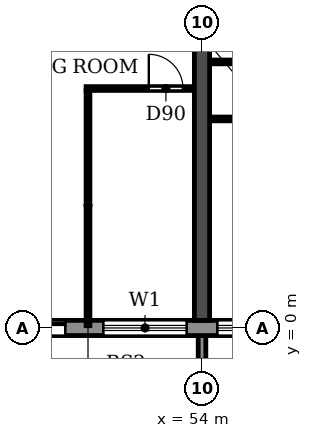
"""IFC4 building model, lengths in metres.
Left out: names, types, materials, properties, quantities, classifications, styles, units other than length and angle.
Written with IfcOpenShell. Run it as: python <this file> out.ifc"""

import sys

from ifc_helpers import new_model, si_unit, direction, frame, frame_2d, origin, place, context, subcontext, project, spatial, polyline, rectangle, outline, extrude, source, transform, mapped, element, fill, save


model = new_model("IFC4")
c1 = context("Model", 3, precision=1e-05, world=origin(), true_north=direction((0.0, 1.0)))
c2 = subcontext(c1, "Body", "Model", "MODEL_VIEW")
j1 = project(units=[si_unit("LENGTHUNIT", "METRE"), si_unit("PLANEANGLEUNIT", "RADIAN")], contexts=[c1])
p1 = place(None, origin())
s1 = spatial("IfcSite", under=j1, at=p1, CompositionType="ELEMENT")
p2 = place(p1, origin())
s2 = spatial("IfcBuilding", under=s1, at=p2, CompositionType="ELEMENT")
p3 = place(p2, frame((0.0, 0.0, 23.4)))
s3 = spatial("IfcBuildingStorey", under=s2, at=p3, CompositionType="ELEMENT", Elevation=23.4)
p4 = place(p3, frame((54.0, 0.2, 0.0), z_axis=(0.0, 0.0, 1.0), x_axis=(0.0, 1.0, 0.0)))
e1 = element("IfcWall", 1, at=p4, inside=s3, PredefinedType="SHEAR", context=c2, shape_type="SweptSolid", body=[
    extrude(rectangle(XDim=11.65, YDim=0.4, at=frame_2d((5.825, 0.0))), origin(), (0.0, 0.0, 1.0), 3.05),
])
p5 = place(p3, frame((4.683, 0.0, 0.0), z_axis=(0.0, 0.0, 1.0), x_axis=(1.0, 0.0, 0.0)))
e2 = element("IfcWall", 2, at=p5, inside=s3, PredefinedType="STANDARD", context=c2, shape_type="SweptSolid", body=[
    extrude(rectangle(XDim=92.634, YDim=0.4, at=frame_2d((46.317, 0.0))), origin(), (0.0, 0.0, 1.0), 3.05),
])
p6 = place(p5, frame((1.717, 0.0, 0.9)))
e3 = element("IfcOpeningElement", 3, at=p6, cuts=e2, PredefinedType="OPENING", context=c2, shape_type="SweptSolid", body=[
    extrude(rectangle(XDim=2.2, YDim=1.5, at=frame_2d((1.1, 0.75))), frame((0.0, 0.21, 0.0), z_axis=(0.0, -1.0, 0.0), x_axis=(1.0, 0.0, 0.0)), (0.0, 0.0, 1.0), 0.42),
])
p7 = place(p5, frame((4.717, 0.0, 0.9)))
e4 = element("IfcOpeningElement", 4, at=p7, cuts=e2, PredefinedType="OPENING", context=c2, shape_type="SweptSolid", body=[
    extrude(rectangle(XDim=2.2, YDim=1.5, at=frame_2d((1.1, 0.75))), frame((0.0, 0.21, 0.0), z_axis=(0.0, -1.0, 0.0), x_axis=(1.0, 0.0, 0.0)), (0.0, 0.0, 1.0), 0.42),
])
p8 = place(p5, frame((7.717, 0.0, 0.9)))
e5 = element("IfcOpeningElement", 5, at=p8, cuts=e2, PredefinedType="OPENING", context=c2, shape_type="SweptSolid", body=[
    extrude(rectangle(XDim=2.2, YDim=1.5, at=frame_2d((1.1, 0.75))), frame((0.0, 0.21, 0.0), z_axis=(0.0, -1.0, 0.0), x_axis=(1.0, 0.0, 0.0)), (0.0, 0.0, 1.0), 0.42),
])
p9 = place(p5, frame((10.717, 0.0, 0.9)))
e6 = element("IfcOpeningElement", 6, at=p9, cuts=e2, PredefinedType="OPENING", context=c2, shape_type="SweptSolid", body=[
    extrude(rectangle(XDim=2.2, YDim=1.5, at=frame_2d((1.1, 0.75))), frame((0.0, 0.21, 0.0), z_axis=(0.0, -1.0, 0.0), x_axis=(1.0, 0.0, 0.0)), (0.0, 0.0, 1.0), 0.42),
])
p10 = place(p5, frame((13.717, 0.0, 0.9)))
e7 = element("IfcOpeningElement", 7, at=p10, cuts=e2, PredefinedType="OPENING", context=c2, shape_type="SweptSolid", body=[
    extrude(rectangle(XDim=2.2, YDim=1.5, at=frame_2d((1.1, 0.75))), frame((0.0, 0.21, 0.0), z_axis=(0.0, -1.0, 0.0), x_axis=(1.0, 0.0, 0.0)), (0.0, 0.0, 1.0), 0.42),
])
p11 = place(p5, frame((16.717, 0.0, 0.9)))
e8 = element("IfcOpeningElement", 8, at=p11, cuts=e2, PredefinedType="OPENING", context=c2, shape_type="SweptSolid", body=[
    extrude(rectangle(XDim=2.2, YDim=1.5, at=frame_2d((1.1, 0.75))), frame((0.0, 0.21, 0.0), z_axis=(0.0, -1.0, 0.0), x_axis=(1.0, 0.0, 0.0)), (0.0, 0.0, 1.0), 0.42),
])
p12 = place(p5, frame((19.917, 0.0, 0.0)))
e9 = element("IfcOpeningElement", 9, at=p12, cuts=e2, PredefinedType="OPENING", context=c2, shape_type="SweptSolid", body=[
    extrude(rectangle(XDim=1.8, YDim=2.4, at=frame_2d((0.9, 1.2))), frame((0.0, 0.21, 0.0), z_axis=(0.0, -1.0, 0.0), x_axis=(1.0, 0.0, 0.0)), (0.0, 0.0, 1.0), 0.42),
])
p13 = place(p5, frame((22.717, 0.0, 0.9)))
e10 = element("IfcOpeningElement", 10, at=p13, cuts=e2, PredefinedType="OPENING", context=c2, shape_type="SweptSolid", body=[
    extrude(rectangle(XDim=2.2, YDim=1.5, at=frame_2d((1.1, 0.75))), frame((0.0, 0.21, 0.0), z_axis=(0.0, -1.0, 0.0), x_axis=(1.0, 0.0, 0.0)), (0.0, 0.0, 1.0), 0.42),
])
p14 = place(p5, frame((25.717, 0.0, 0.9)))
e11 = element("IfcOpeningElement", 11, at=p14, cuts=e2, PredefinedType="OPENING", context=c2, shape_type="SweptSolid", body=[
    extrude(rectangle(XDim=2.2, YDim=1.5, at=frame_2d((1.1, 0.75))), frame((0.0, 0.21, 0.0), z_axis=(0.0, -1.0, 0.0), x_axis=(1.0, 0.0, 0.0)), (0.0, 0.0, 1.0), 0.42),
])
p15 = place(p5, frame((28.717, 0.0, 0.9)))
e12 = element("IfcOpeningElement", 12, at=p15, cuts=e2, PredefinedType="OPENING", context=c2, shape_type="SweptSolid", body=[
    extrude(rectangle(XDim=2.2, YDim=1.5, at=frame_2d((1.1, 0.75))), frame((0.0, 0.21, 0.0), z_axis=(0.0, -1.0, 0.0), x_axis=(1.0, 0.0, 0.0)), (0.0, 0.0, 1.0), 0.42),
])
p16 = place(p5, frame((31.917, 0.0, 0.0)))
e13 = element("IfcOpeningElement", 13, at=p16, cuts=e2, PredefinedType="OPENING", context=c2, shape_type="SweptSolid", body=[
    extrude(rectangle(XDim=1.8, YDim=2.4, at=frame_2d((0.9, 1.2))), frame((0.0, 0.21, 0.0), z_axis=(0.0, -1.0, 0.0), x_axis=(1.0, 0.0, 0.0)), (0.0, 0.0, 1.0), 0.42),
])
p17 = place(p5, frame((34.717, 0.0, 0.9)))
e14 = element("IfcOpeningElement", 14, at=p17, cuts=e2, PredefinedType="OPENING", context=c2, shape_type="SweptSolid", body=[
    extrude(rectangle(XDim=2.2, YDim=1.5, at=frame_2d((1.1, 0.75))), frame((0.0, 0.21, 0.0), z_axis=(0.0, -1.0, 0.0), x_axis=(1.0, 0.0, 0.0)), (0.0, 0.0, 1.0), 0.42),
])
p18 = place(p5, frame((37.717, 0.0, 0.9)))
e15 = element("IfcOpeningElement", 15, at=p18, cuts=e2, PredefinedType="OPENING", context=c2, shape_type="SweptSolid", body=[
    extrude(rectangle(XDim=2.2, YDim=1.5, at=frame_2d((1.1, 0.75))), frame((0.0, 0.21, 0.0), z_axis=(0.0, -1.0, 0.0), x_axis=(1.0, 0.0, 0.0)), (0.0, 0.0, 1.0), 0.42),
])
p19 = place(p5, frame((40.717, 0.0, 0.9)))
e16 = element("IfcOpeningElement", 16, at=p19, cuts=e2, PredefinedType="OPENING", context=c2, shape_type="SweptSolid", body=[
    extrude(rectangle(XDim=2.2, YDim=1.5, at=frame_2d((1.1, 0.75))), frame((0.0, 0.21, 0.0), z_axis=(0.0, -1.0, 0.0), x_axis=(1.0, 0.0, 0.0)), (0.0, 0.0, 1.0), 0.42),
])
p20 = place(p5, frame((43.917, 0.0, 0.0)))
e17 = element("IfcOpeningElement", 17, at=p20, cuts=e2, PredefinedType="OPENING", context=c2, shape_type="SweptSolid", body=[
    extrude(rectangle(XDim=1.8, YDim=2.4, at=frame_2d((0.9, 1.2))), frame((0.0, 0.21, 0.0), z_axis=(0.0, -1.0, 0.0), x_axis=(1.0, 0.0, 0.0)), (0.0, 0.0, 1.0), 0.42),
])
p21 = place(p5, frame((46.717, 0.0, 0.9)))
e18 = element("IfcOpeningElement", 18, at=p21, cuts=e2, PredefinedType="OPENING", context=c2, shape_type="SweptSolid", body=[
    extrude(rectangle(XDim=2.2, YDim=1.5, at=frame_2d((1.1, 0.75))), frame((0.0, 0.21, 0.0), z_axis=(0.0, -1.0, 0.0), x_axis=(1.0, 0.0, 0.0)), (0.0, 0.0, 1.0), 0.42),
])
p22 = place(p5, frame((49.717, 0.0, 0.9)))
e19 = element("IfcOpeningElement", 19, at=p22, cuts=e2, PredefinedType="OPENING", context=c2, shape_type="SweptSolid", body=[
    extrude(rectangle(XDim=2.2, YDim=1.5, at=frame_2d((1.1, 0.75))), frame((0.0, 0.21, 0.0), z_axis=(0.0, -1.0, 0.0), x_axis=(1.0, 0.0, 0.0)), (0.0, 0.0, 1.0), 0.42),
])
p23 = place(p5, frame((52.717, 0.0, 0.9)))
e20 = element("IfcOpeningElement", 20, at=p23, cuts=e2, PredefinedType="OPENING", context=c2, shape_type="SweptSolid", body=[
    extrude(rectangle(XDim=2.2, YDim=1.5, at=frame_2d((1.1, 0.75))), frame((0.0, 0.21, 0.0), z_axis=(0.0, -1.0, 0.0), x_axis=(1.0, 0.0, 0.0)), (0.0, 0.0, 1.0), 0.42),
])
p24 = place(p5, frame((55.717, 0.0, 0.9)))
e21 = element("IfcOpeningElement", 21, at=p24, cuts=e2, PredefinedType="OPENING", context=c2, shape_type="SweptSolid", body=[
    extrude(rectangle(XDim=2.2, YDim=1.5, at=frame_2d((1.1, 0.75))), frame((0.0, 0.21, 0.0), z_axis=(0.0, -1.0, 0.0), x_axis=(1.0, 0.0, 0.0)), (0.0, 0.0, 1.0), 0.42),
])
p25 = place(p5, frame((58.917, 0.0, 0.0)))
e22 = element("IfcOpeningElement", 22, at=p25, cuts=e2, PredefinedType="OPENING", context=c2, shape_type="SweptSolid", body=[
    extrude(rectangle(XDim=1.8, YDim=2.4, at=frame_2d((0.9, 1.2))), frame((0.0, 0.21, 0.0), z_axis=(0.0, -1.0, 0.0), x_axis=(1.0, 0.0, 0.0)), (0.0, 0.0, 1.0), 0.42),
])
p26 = place(p5, frame((61.717, 0.0, 0.9)))
e23 = element("IfcOpeningElement", 23, at=p26, cuts=e2, PredefinedType="OPENING", context=c2, shape_type="SweptSolid", body=[
    extrude(rectangle(XDim=2.2, YDim=1.5, at=frame_2d((1.1, 0.75))), frame((0.0, 0.21, 0.0), z_axis=(0.0, -1.0, 0.0), x_axis=(1.0, 0.0, 0.0)), (0.0, 0.0, 1.0), 0.42),
])
p27 = place(p5, frame((64.717, 0.0, 0.9)))
e24 = element("IfcOpeningElement", 24, at=p27, cuts=e2, PredefinedType="OPENING", context=c2, shape_type="SweptSolid", body=[
    extrude(rectangle(XDim=2.2, YDim=1.5, at=frame_2d((1.1, 0.75))), frame((0.0, 0.21, 0.0), z_axis=(0.0, -1.0, 0.0), x_axis=(1.0, 0.0, 0.0)), (0.0, 0.0, 1.0), 0.42),
])
p28 = place(p5, frame((67.717, 0.0, 0.9)))
e25 = element("IfcOpeningElement", 25, at=p28, cuts=e2, PredefinedType="OPENING", context=c2, shape_type="SweptSolid", body=[
    extrude(rectangle(XDim=2.2, YDim=1.5, at=frame_2d((1.1, 0.75))), frame((0.0, 0.21, 0.0), z_axis=(0.0, -1.0, 0.0), x_axis=(1.0, 0.0, 0.0)), (0.0, 0.0, 1.0), 0.42),
])
p29 = place(p5, frame((70.917, 0.0, 0.0)))
e26 = element("IfcOpeningElement", 26, at=p29, cuts=e2, PredefinedType="OPENING", context=c2, shape_type="SweptSolid", body=[
    extrude(rectangle(XDim=1.8, YDim=2.4, at=frame_2d((0.9, 1.2))), frame((0.0, 0.21, 0.0), z_axis=(0.0, -1.0, 0.0), x_axis=(1.0, 0.0, 0.0)), (0.0, 0.0, 1.0), 0.42),
])
p30 = place(p5, frame((73.717, 0.0, 0.9)))
e27 = element("IfcOpeningElement", 27, at=p30, cuts=e2, PredefinedType="OPENING", context=c2, shape_type="SweptSolid", body=[
    extrude(rectangle(XDim=2.2, YDim=1.5, at=frame_2d((1.1, 0.75))), frame((0.0, 0.21, 0.0), z_axis=(0.0, -1.0, 0.0), x_axis=(1.0, 0.0, 0.0)), (0.0, 0.0, 1.0), 0.42),
])
p31 = place(p5, frame((76.717, 0.0, 0.9)))
e28 = element("IfcOpeningElement", 28, at=p31, cuts=e2, PredefinedType="OPENING", context=c2, shape_type="SweptSolid", body=[
    extrude(rectangle(XDim=2.2, YDim=1.5, at=frame_2d((1.1, 0.75))), frame((0.0, 0.21, 0.0), z_axis=(0.0, -1.0, 0.0), x_axis=(1.0, 0.0, 0.0)), (0.0, 0.0, 1.0), 0.42),
])
p32 = place(p5, frame((79.717, 0.0, 0.9)))
e29 = element("IfcOpeningElement", 29, at=p32, cuts=e2, PredefinedType="OPENING", context=c2, shape_type="SweptSolid", body=[
    extrude(rectangle(XDim=2.2, YDim=1.5, at=frame_2d((1.1, 0.75))), frame((0.0, 0.21, 0.0), z_axis=(0.0, -1.0, 0.0), x_axis=(1.0, 0.0, 0.0)), (0.0, 0.0, 1.0), 0.42),
])
p33 = place(p5, frame((82.717, 0.0, 0.9)))
e30 = element("IfcOpeningElement", 30, at=p33, cuts=e2, PredefinedType="OPENING", context=c2, shape_type="SweptSolid", body=[
    extrude(rectangle(XDim=2.2, YDim=1.5, at=frame_2d((1.1, 0.75))), frame((0.0, 0.21, 0.0), z_axis=(0.0, -1.0, 0.0), x_axis=(1.0, 0.0, 0.0)), (0.0, 0.0, 1.0), 0.42),
])
p34 = place(p5, frame((85.717, 0.0, 0.9)))
e31 = element("IfcOpeningElement", 31, at=p34, cuts=e2, PredefinedType="OPENING", context=c2, shape_type="SweptSolid", body=[
    extrude(rectangle(XDim=2.2, YDim=1.5, at=frame_2d((1.1, 0.75))), frame((0.0, 0.21, 0.0), z_axis=(0.0, -1.0, 0.0), x_axis=(1.0, 0.0, 0.0)), (0.0, 0.0, 1.0), 0.42),
])
p35 = place(p5, frame((88.717, 0.0, 0.9)))
e32 = element("IfcOpeningElement", 32, at=p35, cuts=e2, PredefinedType="OPENING", context=c2, shape_type="SweptSolid", body=[
    extrude(rectangle(XDim=2.2, YDim=1.5, at=frame_2d((1.1, 0.75))), frame((0.0, 0.21, 0.0), z_axis=(0.0, -1.0, 0.0), x_axis=(1.0, 0.0, 0.0)), (0.0, 0.0, 1.0), 0.42),
])
m1 = source(origin(), c2, "Body", "SweptSolid", [
    extrude(outline(polyline([(0.0, 0.0), (0.2, 0.0), (0.2, 1.65), (0.0, 1.65), (0.0, 0.0)])), origin(), (0.0, 0.0, 1.0), 3.1),
])
p36 = place(p3, frame((53.9, -1.85, 0.0)))
e33 = element("IfcWall", 33, at=p36, inside=s3, PredefinedType="STANDARD", context=c2, shape_type="MappedRepresentation", body=[
    mapped(m1, transform((0.0, 0.0, 0.0))),
])
p37 = place(p3, frame((54.21, 5.5, 0.0), z_axis=(0.0, 0.0, 1.0), x_axis=(1.0, 0.0, 0.0)))
e34 = element("IfcWall", 34, at=p37, inside=s3, PredefinedType="PARTITIONING", context=c2, shape_type="SweptSolid", body=[
    extrude(rectangle(XDim=5.58, YDim=0.1, at=frame_2d((2.79, 0.0))), origin(), (0.0, 0.0, 1.0), 3.05),
])
p38 = place(p37, frame((1.39, 0.0, 0.0)))
e35 = element("IfcOpeningElement", 35, at=p38, cuts=e34, PredefinedType="OPENING", context=c2, shape_type="SweptSolid", body=[
    extrude(rectangle(XDim=0.9, YDim=2.1, at=frame_2d((0.45, 1.05))), frame((0.0, 0.06, 0.0), z_axis=(0.0, -1.0, 0.0), x_axis=(1.0, 0.0, 0.0)), (0.0, 0.0, 1.0), 0.12),
])
p39 = place(p37, frame((3.29, 0.0, 0.0)))
e36 = element("IfcOpeningElement", 36, at=p39, cuts=e34, PredefinedType="OPENING", context=c2, shape_type="SweptSolid", body=[
    extrude(rectangle(XDim=0.9, YDim=2.1, at=frame_2d((0.45, 1.05))), frame((0.0, 0.06, 0.0), z_axis=(0.0, -1.0, 0.0), x_axis=(1.0, 0.0, 0.0)), (0.0, 0.0, 1.0), 0.12),
])
p40 = place(p3, frame((50.95, 6.3, 0.0), z_axis=(0.0, 0.0, 1.0), x_axis=(1.0, 0.0, 0.0)))
e37 = element("IfcWall", 37, at=p40, inside=s3, PredefinedType="PARTITIONING", context=c2, shape_type="SweptSolid", body=[
    extrude(rectangle(XDim=2.84, YDim=0.1, at=frame_2d((1.42, 0.0))), origin(), (0.0, 0.0, 1.0), 3.05),
])
p41 = place(p40, frame((1.65, 0.0, 0.0)))
e38 = element("IfcOpeningElement", 38, at=p41, cuts=e37, PredefinedType="OPENING", context=c2, shape_type="SweptSolid", body=[
    extrude(rectangle(XDim=0.9, YDim=2.1, at=frame_2d((0.45, 1.05))), frame((0.0, 0.06, 0.0), z_axis=(0.0, -1.0, 0.0), x_axis=(1.0, 0.0, 0.0)), (0.0, 0.0, 1.0), 0.12),
])
p42 = place(p3, frame((54.21, 7.0, 0.0), z_axis=(0.0, 0.0, 1.0), x_axis=(1.0, 0.0, 0.0)))
e39 = element("IfcWall", 39, at=p42, inside=s3, PredefinedType="PARTITIONING", context=c2, shape_type="SweptSolid", body=[
    extrude(rectangle(XDim=3.14, YDim=0.1, at=frame_2d((1.57, 0.0))), origin(), (0.0, 0.0, 1.0), 3.05),
])
p43 = place(p42, frame((1.04, 0.0, 0.0)))
e40 = element("IfcOpeningElement", 40, at=p43, cuts=e39, PredefinedType="OPENING", context=c2, shape_type="SweptSolid", body=[
    extrude(rectangle(XDim=0.8, YDim=2.1, at=frame_2d((0.4, 1.05))), frame((0.0, 0.06, 0.0), z_axis=(0.0, -1.0, 0.0), x_axis=(1.0, 0.0, 0.0)), (0.0, 0.0, 1.0), 0.12),
])
p44 = place(p3, frame((51.0, 0.06, 0.0), z_axis=(0.0, 0.0, 1.0), x_axis=(0.0, 1.0, 0.0)))
e41 = element("IfcWall", 41, at=p44, inside=s3, PredefinedType="PARTITIONING", context=c2, shape_type="SweptSolid", body=[
    extrude(rectangle(XDim=6.19, YDim=0.1, at=frame_2d((3.095, 0.0))), origin(), (0.0, 0.0, 1.0), 3.05),
])
p45 = place(p20, origin())
e42 = element("IfcDoor", 42, at=p45, inside=s3, OperationType="DOUBLE_DOOR_SLIDING", PredefinedType="DOOR", context=c2, shape_type="SweptSolid", body=[
    extrude(rectangle(XDim=1.8, YDim=2.4, at=frame_2d((0.9, 1.2))), frame((0.0, 0.025, 0.0), z_axis=(0.0, -1.0, 0.0), x_axis=(1.0, 0.0, 0.0)), (0.0, 0.0, 1.0), 0.05),
])
fill(e17, e42)
p46 = place(p21, origin())
e43 = element("IfcWindow", 43, at=p46, inside=s3, PartitioningType="DOUBLE_PANEL_HORIZONTAL", PredefinedType="WINDOW", context=c2, shape_type="SweptSolid", body=[
    extrude(rectangle(XDim=2.2, YDim=1.5, at=frame_2d((1.1, 0.75))), frame((0.0, 0.03, 0.0), z_axis=(0.0, -1.0, 0.0), x_axis=(1.0, 0.0, 0.0)), (0.0, 0.0, 1.0), 0.06),
])
fill(e18, e43)
p47 = place(p22, origin())
e44 = element("IfcWindow", 44, at=p47, inside=s3, PartitioningType="DOUBLE_PANEL_HORIZONTAL", PredefinedType="WINDOW", context=c2, shape_type="SweptSolid", body=[
    extrude(rectangle(XDim=2.2, YDim=1.5, at=frame_2d((1.1, 0.75))), frame((0.0, 0.03, 0.0), z_axis=(0.0, -1.0, 0.0), x_axis=(1.0, 0.0, 0.0)), (0.0, 0.0, 1.0), 0.06),
])
fill(e19, e44)
p48 = place(p41, origin())
e45 = element("IfcDoor", 45, at=p48, inside=s3, OperationType="SINGLE_SWING_LEFT", PredefinedType="DOOR", context=c2, shape_type="SweptSolid", body=[
    extrude(rectangle(XDim=0.9, YDim=2.1, at=frame_2d((0.45, 1.05))), frame((0.0, 0.025, 0.0), z_axis=(0.0, -1.0, 0.0), x_axis=(1.0, 0.0, 0.0)), (0.0, 0.0, 1.0), 0.05),
])
fill(e38, e45)
save(model, sys.argv[1])
